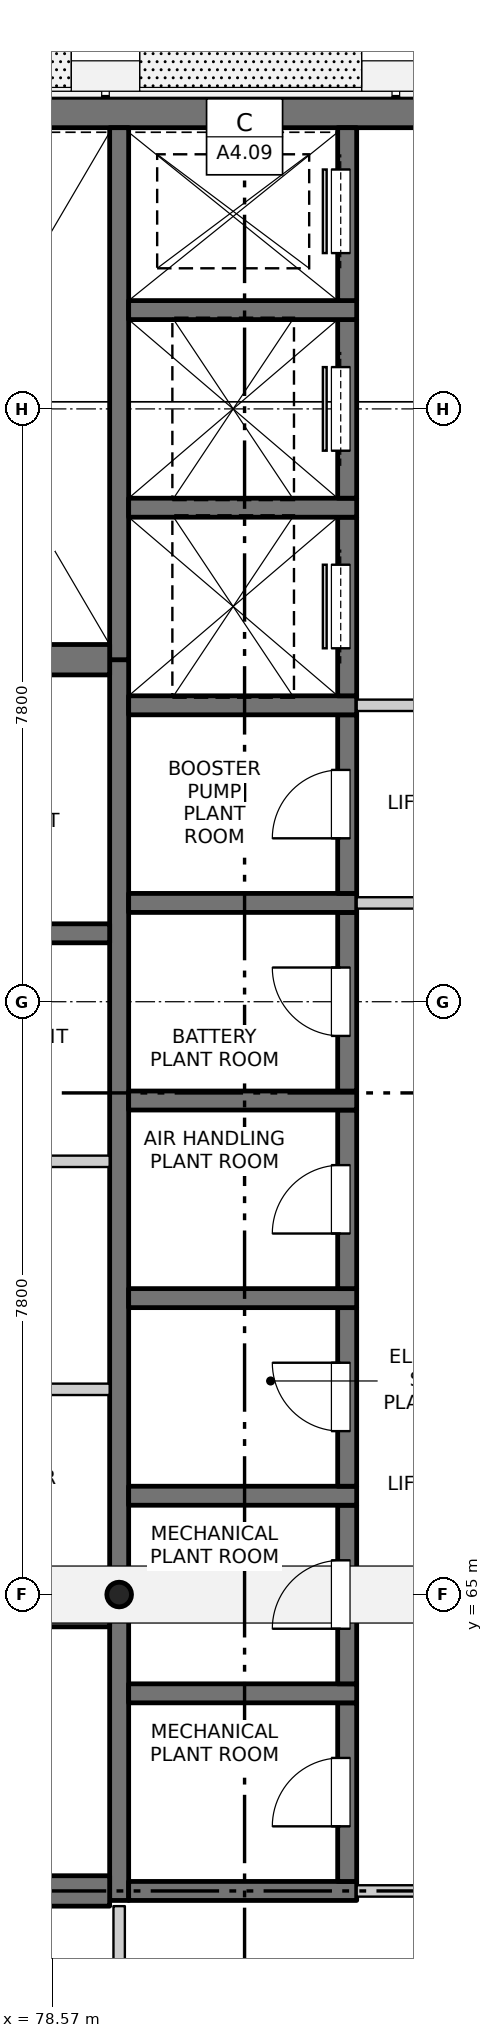
"""IFC4 building model, lengths in metres.
Left out: names, types, materials, properties, quantities, classifications, styles, units other than length and angle.
Written with IfcOpenShell. Run it as: python <this file> out.ifc"""

import sys

from ifc_helpers import new_model, si_unit, direction, frame, frame_2d, origin, origin_2d, place, context, subcontext, project, spatial, rectangle, hollow_circle, extrude, element, fill, save


model = new_model("IFC4")
c1 = context("Model", 3, precision=1e-05, world=origin(), true_north=direction((0.0, 1.0)))
c2 = subcontext(c1, "Body", "Model", "MODEL_VIEW")
j1 = project(units=[si_unit("LENGTHUNIT", "METRE"), si_unit("PLANEANGLEUNIT", "RADIAN")], contexts=[c1])
p1 = place(None, origin())
s1 = spatial("IfcSite", under=j1, at=p1, CompositionType="ELEMENT")
p2 = place(p1, origin())
s2 = spatial("IfcBuilding", under=s1, at=p2, CompositionType="ELEMENT")
p3 = place(p2, frame((0.0, 0.0, 266.4)))
s3 = spatial("IfcBuildingStorey", under=s2, at=p3, CompositionType="ELEMENT", Elevation=266.4)
p4 = place(p3, frame((75.45, 84.5, -0.3), z_axis=(0.0, 0.0, 1.0), x_axis=(1.0, 0.0, 0.0)))
e1 = element("IfcWall", 1, at=p4, inside=s3, PredefinedType="SOLIDWALL", context=c2, shape_type="SweptSolid", body=[
    extrude(rectangle(XDim=19.1, YDim=0.4, at=frame_2d((9.55, 0.0))), origin(), (0.0, 0.0, 1.0), 6.0),
])
p5 = place(p3, frame((79.45, 60.975, -0.3), z_axis=(0.0, 0.0, 1.0), x_axis=(0.0, 1.0, 0.0)))
e2 = element("IfcWall", 2, at=p5, inside=s3, PredefinedType="SOLIDWALL", context=c2, shape_type="SweptSolid", body=[
    extrude(rectangle(XDim=16.325, YDim=0.25, at=frame_2d((8.163, 0.0))), origin(), (0.0, 0.0, 1.0), 6.0),
])
p6 = place(p3, frame((79.45, 77.3, -0.3), z_axis=(0.0, 0.0, 1.0), x_axis=(0.0, 1.0, 0.0)))
e3 = element("IfcWall", 3, at=p6, inside=s3, PredefinedType="SOLIDWALL", context=c2, shape_type="SweptSolid", body=[
    extrude(rectangle(XDim=7.0, YDim=0.25, at=frame_2d((3.5, 0.0))), origin(), (0.0, 0.0, 1.0), 6.0),
])
p7 = place(p3, frame((79.575, 61.1, -0.3), z_axis=(0.0, 0.0, 1.0), x_axis=(1.0, 0.0, 0.0)))
e4 = element("IfcWall", 4, at=p7, inside=s3, PredefinedType="SOLIDWALL", context=c2, shape_type="SweptSolid", body=[
    extrude(rectangle(XDim=3.0, YDim=0.25, at=frame_2d((1.5, 0.0))), origin(), (0.0, 0.0, 1.0), 6.0),
])
p8 = place(p3, frame((82.45, 61.225, -0.3), z_axis=(0.0, 0.0, 1.0), x_axis=(0.0, 1.0, 0.0)))
e5 = element("IfcWall", 5, at=p8, inside=s3, PredefinedType="SOLIDWALL", context=c2, shape_type="SweptSolid", body=[
    extrude(rectangle(XDim=2.35, YDim=0.25, at=frame_2d((1.175, 0.0))), origin(), (0.0, 0.0, 1.0), 6.0),
])
p9 = place(p8, frame((0.725, 0.0, 0.3)))
e6 = element("IfcOpeningElement", 6, at=p9, cuts=e5, PredefinedType="OPENING", context=c2, shape_type="SweptSolid", body=[
    extrude(rectangle(XDim=0.9, YDim=2.1, at=frame_2d((0.45, 1.05))), frame((0.0, 0.135, 0.0), z_axis=(0.0, -1.0, 0.0), x_axis=(1.0, 0.0, 0.0)), (0.0, 0.0, 1.0), 0.27),
])
p10 = place(p3, frame((79.575, 63.7, -0.3), z_axis=(0.0, 0.0, 1.0), x_axis=(1.0, 0.0, 0.0)))
e7 = element("IfcWall", 7, at=p10, inside=s3, PredefinedType="SOLIDWALL", context=c2, shape_type="SweptSolid", body=[
    extrude(rectangle(XDim=3.0, YDim=0.25, at=frame_2d((1.5, 0.0))), origin(), (0.0, 0.0, 1.0), 6.0),
])
p11 = place(p3, frame((82.45, 63.825, -0.3), z_axis=(0.0, 0.0, 1.0), x_axis=(0.0, 1.0, 0.0)))
e8 = element("IfcWall", 8, at=p11, inside=s3, PredefinedType="SOLIDWALL", context=c2, shape_type="SweptSolid", body=[
    extrude(rectangle(XDim=2.35, YDim=0.25, at=frame_2d((1.175, 0.0))), origin(), (0.0, 0.0, 1.0), 6.0),
])
p12 = place(p11, frame((0.725, 0.0, 0.3)))
e9 = element("IfcOpeningElement", 9, at=p12, cuts=e8, PredefinedType="OPENING", context=c2, shape_type="SweptSolid", body=[
    extrude(rectangle(XDim=0.9, YDim=2.1, at=frame_2d((0.45, 1.05))), frame((0.0, 0.135, 0.0), z_axis=(0.0, -1.0, 0.0), x_axis=(1.0, 0.0, 0.0)), (0.0, 0.0, 1.0), 0.27),
])
p13 = place(p3, frame((79.575, 66.3, -0.3), z_axis=(0.0, 0.0, 1.0), x_axis=(1.0, 0.0, 0.0)))
e10 = element("IfcWall", 10, at=p13, inside=s3, PredefinedType="SOLIDWALL", context=c2, shape_type="SweptSolid", body=[
    extrude(rectangle(XDim=3.0, YDim=0.25, at=frame_2d((1.5, 0.0))), origin(), (0.0, 0.0, 1.0), 6.0),
])
p14 = place(p3, frame((82.45, 66.425, -0.3), z_axis=(0.0, 0.0, 1.0), x_axis=(0.0, 1.0, 0.0)))
e11 = element("IfcWall", 11, at=p14, inside=s3, PredefinedType="SOLIDWALL", context=c2, shape_type="SweptSolid", body=[
    extrude(rectangle(XDim=2.35, YDim=0.25, at=frame_2d((1.175, 0.0))), origin(), (0.0, 0.0, 1.0), 6.0),
])
p15 = place(p14, frame((0.725, 0.0, 0.3)))
e12 = element("IfcOpeningElement", 12, at=p15, cuts=e11, PredefinedType="OPENING", context=c2, shape_type="SweptSolid", body=[
    extrude(rectangle(XDim=0.9, YDim=2.1, at=frame_2d((0.45, 1.05))), frame((0.0, 0.135, 0.0), z_axis=(0.0, -1.0, 0.0), x_axis=(1.0, 0.0, 0.0)), (0.0, 0.0, 1.0), 0.27),
])
p16 = place(p3, frame((79.575, 68.9, -0.3), z_axis=(0.0, 0.0, 1.0), x_axis=(1.0, 0.0, 0.0)))
e13 = element("IfcWall", 13, at=p16, inside=s3, PredefinedType="SOLIDWALL", context=c2, shape_type="SweptSolid", body=[
    extrude(rectangle(XDim=3.0, YDim=0.25, at=frame_2d((1.5, 0.0))), origin(), (0.0, 0.0, 1.0), 6.0),
])
p17 = place(p3, frame((82.45, 69.025, -0.3), z_axis=(0.0, 0.0, 1.0), x_axis=(0.0, 1.0, 0.0)))
e14 = element("IfcWall", 14, at=p17, inside=s3, PredefinedType="SOLIDWALL", context=c2, shape_type="SweptSolid", body=[
    extrude(rectangle(XDim=2.35, YDim=0.25, at=frame_2d((1.175, 0.0))), origin(), (0.0, 0.0, 1.0), 6.0),
])
p18 = place(p17, frame((0.725, 0.0, 0.3)))
e15 = element("IfcOpeningElement", 15, at=p18, cuts=e14, PredefinedType="OPENING", context=c2, shape_type="SweptSolid", body=[
    extrude(rectangle(XDim=0.9, YDim=2.1, at=frame_2d((0.45, 1.05))), frame((0.0, 0.135, 0.0), z_axis=(0.0, -1.0, 0.0), x_axis=(1.0, 0.0, 0.0)), (0.0, 0.0, 1.0), 0.27),
])
p19 = place(p3, frame((79.575, 71.5, -0.3), z_axis=(0.0, 0.0, 1.0), x_axis=(1.0, 0.0, 0.0)))
e16 = element("IfcWall", 16, at=p19, inside=s3, PredefinedType="SOLIDWALL", context=c2, shape_type="SweptSolid", body=[
    extrude(rectangle(XDim=3.0, YDim=0.25, at=frame_2d((1.5, 0.0))), origin(), (0.0, 0.0, 1.0), 6.0),
])
p20 = place(p3, frame((82.45, 71.625, -0.3), z_axis=(0.0, 0.0, 1.0), x_axis=(0.0, 1.0, 0.0)))
e17 = element("IfcWall", 17, at=p20, inside=s3, PredefinedType="SOLIDWALL", context=c2, shape_type="SweptSolid", body=[
    extrude(rectangle(XDim=2.35, YDim=0.25, at=frame_2d((1.175, 0.0))), origin(), (0.0, 0.0, 1.0), 6.0),
])
p21 = place(p20, frame((0.725, 0.0, 0.3)))
e18 = element("IfcOpeningElement", 18, at=p21, cuts=e17, PredefinedType="OPENING", context=c2, shape_type="SweptSolid", body=[
    extrude(rectangle(XDim=0.9, YDim=2.1, at=frame_2d((0.45, 1.05))), frame((0.0, 0.135, 0.0), z_axis=(0.0, -1.0, 0.0), x_axis=(1.0, 0.0, 0.0)), (0.0, 0.0, 1.0), 0.27),
])
p22 = place(p3, frame((79.575, 74.1, -0.3), z_axis=(0.0, 0.0, 1.0), x_axis=(1.0, 0.0, 0.0)))
e19 = element("IfcWall", 19, at=p22, inside=s3, PredefinedType="SOLIDWALL", context=c2, shape_type="SweptSolid", body=[
    extrude(rectangle(XDim=3.0, YDim=0.25, at=frame_2d((1.5, 0.0))), origin(), (0.0, 0.0, 1.0), 6.0),
])
p23 = place(p3, frame((82.45, 74.225, -0.3), z_axis=(0.0, 0.0, 1.0), x_axis=(0.0, 1.0, 0.0)))
e20 = element("IfcWall", 20, at=p23, inside=s3, PredefinedType="SOLIDWALL", context=c2, shape_type="SweptSolid", body=[
    extrude(rectangle(XDim=2.35, YDim=0.25, at=frame_2d((1.175, 0.0))), origin(), (0.0, 0.0, 1.0), 6.0),
])
p24 = place(p23, frame((0.725, 0.0, 0.3)))
e21 = element("IfcOpeningElement", 21, at=p24, cuts=e20, PredefinedType="OPENING", context=c2, shape_type="SweptSolid", body=[
    extrude(rectangle(XDim=0.9, YDim=2.1, at=frame_2d((0.45, 1.05))), frame((0.0, 0.135, 0.0), z_axis=(0.0, -1.0, 0.0), x_axis=(1.0, 0.0, 0.0)), (0.0, 0.0, 1.0), 0.27),
])
p25 = place(p3, frame((79.575, 76.7, -0.3), z_axis=(0.0, 0.0, 1.0), x_axis=(1.0, 0.0, 0.0)))
e22 = element("IfcWall", 22, at=p25, inside=s3, PredefinedType="SOLIDWALL", context=c2, shape_type="SweptSolid", body=[
    extrude(rectangle(XDim=3.0, YDim=0.25, at=frame_2d((1.5, 0.0))), origin(), (0.0, 0.0, 1.0), 6.0),
])
p26 = place(p3, frame((82.45, 76.825, -0.3), z_axis=(0.0, 0.0, 1.0), x_axis=(0.0, 1.0, 0.0)))
e23 = element("IfcWall", 23, at=p26, inside=s3, PredefinedType="SOLIDWALL", context=c2, shape_type="SweptSolid", body=[
    extrude(rectangle(XDim=2.35, YDim=0.25, at=frame_2d((1.175, 0.0))), origin(), (0.0, 0.0, 1.0), 6.0),
])
p27 = place(p26, frame((0.625, 0.0, 0.3)))
e24 = element("IfcOpeningElement", 24, at=p27, cuts=e23, PredefinedType="OPENING", context=c2, shape_type="SweptSolid", body=[
    extrude(rectangle(XDim=1.1, YDim=2.1, at=frame_2d((0.55, 1.05))), frame((0.0, 0.135, 0.0), z_axis=(0.0, -1.0, 0.0), x_axis=(1.0, 0.0, 0.0)), (0.0, 0.0, 1.0), 0.27),
])
p28 = place(p3, frame((79.575, 79.3, -0.3), z_axis=(0.0, 0.0, 1.0), x_axis=(1.0, 0.0, 0.0)))
e25 = element("IfcWall", 25, at=p28, inside=s3, PredefinedType="SOLIDWALL", context=c2, shape_type="SweptSolid", body=[
    extrude(rectangle(XDim=3.0, YDim=0.25, at=frame_2d((1.5, 0.0))), origin(), (0.0, 0.0, 1.0), 6.0),
])
p29 = place(p3, frame((82.45, 79.425, -0.3), z_axis=(0.0, 0.0, 1.0), x_axis=(0.0, 1.0, 0.0)))
e26 = element("IfcWall", 26, at=p29, inside=s3, PredefinedType="SOLIDWALL", context=c2, shape_type="SweptSolid", body=[
    extrude(rectangle(XDim=2.35, YDim=0.25, at=frame_2d((1.175, 0.0))), origin(), (0.0, 0.0, 1.0), 6.0),
])
p30 = place(p29, frame((0.625, 0.0, 0.3)))
e27 = element("IfcOpeningElement", 27, at=p30, cuts=e26, PredefinedType="OPENING", context=c2, shape_type="SweptSolid", body=[
    extrude(rectangle(XDim=1.1, YDim=2.1, at=frame_2d((0.55, 1.05))), frame((0.0, 0.135, 0.0), z_axis=(0.0, -1.0, 0.0), x_axis=(1.0, 0.0, 0.0)), (0.0, 0.0, 1.0), 0.27),
])
p31 = place(p3, frame((79.575, 81.9, -0.3), z_axis=(0.0, 0.0, 1.0), x_axis=(1.0, 0.0, 0.0)))
e28 = element("IfcWall", 28, at=p31, inside=s3, PredefinedType="SOLIDWALL", context=c2, shape_type="SweptSolid", body=[
    extrude(rectangle(XDim=3.0, YDim=0.25, at=frame_2d((1.5, 0.0))), origin(), (0.0, 0.0, 1.0), 6.0),
])
p32 = place(p3, frame((82.45, 82.025, -0.3), z_axis=(0.0, 0.0, 1.0), x_axis=(0.0, 1.0, 0.0)))
e29 = element("IfcWall", 29, at=p32, inside=s3, PredefinedType="SOLIDWALL", context=c2, shape_type="SweptSolid", body=[
    extrude(rectangle(XDim=2.275, YDim=0.25, at=frame_2d((1.138, 0.0))), origin(), (0.0, 0.0, 1.0), 6.0),
])
p33 = place(p32, frame((0.625, 0.0, 0.3)))
e30 = element("IfcOpeningElement", 30, at=p33, cuts=e29, PredefinedType="OPENING", context=c2, shape_type="SweptSolid", body=[
    extrude(rectangle(XDim=1.1, YDim=2.1, at=frame_2d((0.55, 1.05))), frame((0.0, 0.135, 0.0), z_axis=(0.0, -1.0, 0.0), x_axis=(1.0, 0.0, 0.0)), (0.0, 0.0, 1.0), 0.27),
])
p34 = place(p3, frame((75.45, 61.1, -0.3), z_axis=(0.0, 0.0, 1.0), x_axis=(1.0, 0.0, 0.0)))
e31 = element("IfcWall", 31, at=p34, inside=s3, PredefinedType="SOLIDWALL", context=c2, shape_type="SweptSolid", body=[
    extrude(rectangle(XDim=3.875, YDim=0.4, at=frame_2d((1.938, 0.0))), origin(), (0.0, 0.0, 1.0), 6.0),
])
for number, where, z_axis, x_axis in (
    (32, (75.45, 64.7, -0.3), (0.0, 0.0, 1.0), (1.0, 0.0, 0.0)),
    (33, (75.45, 73.7, -0.3), (0.0, 0.0, 1.0), (1.0, 0.0, 0.0)),
):
    element("IfcWall", number, at=place(p3, frame(where, z_axis=z_axis, x_axis=x_axis)), inside=s3, PredefinedType="SOLIDWALL", context=c2, shape_type="SweptSolid", body=[
        extrude(rectangle(XDim=3.875, YDim=0.25, at=frame_2d((1.938, 0.0))), origin(), (0.0, 0.0, 1.0), 6.0),
    ])
p35 = place(p3, frame((75.45, 77.3, -0.3), z_axis=(0.0, 0.0, 1.0), x_axis=(1.0, 0.0, 0.0)))
e34 = element("IfcWall", 34, at=p35, inside=s3, PredefinedType="SOLIDWALL", context=c2, shape_type="SweptSolid", body=[
    extrude(rectangle(XDim=3.875, YDim=0.4, at=frame_2d((1.938, 0.0))), origin(), (0.0, 0.0, 1.0), 6.0),
])
p36 = place(p3, frame((79.45, 65.0, 6.996), z_axis=(0.0, 0.0, 1.0), x_axis=(1.0, 0.0, 0.0)))
e35 = element("IfcColumn", 35, at=p36, inside=s3, PredefinedType="COLUMN", context=c2, shape_type="SweptSolid", body=[
    extrude(hollow_circle(Radius=0.163, WallThickness=0.012, at=origin_2d()), origin(), (0.0, 0.0, 1.0), 8.212),
])
p37 = place(p3, frame((82.575, 61.1, 0.0), z_axis=(0.0, 0.0, 1.0), x_axis=(1.0, 0.0, 0.0)))
e36 = element("IfcWall", 36, at=p37, inside=s3, PredefinedType="PARTITIONING", context=c2, shape_type="SweptSolid", body=[
    extrude(rectangle(XDim=4.85, YDim=0.15, at=frame_2d((2.425, 0.0))), origin(), (0.0, 0.0, 1.0), 5.7),
])
p38 = place(p37, frame((1.525, 0.0, 0.0)))
e37 = element("IfcOpeningElement", 37, at=p38, cuts=e36, PredefinedType="OPENING", context=c2, shape_type="SweptSolid", body=[
    extrude(rectangle(XDim=1.8, YDim=2.1, at=frame_2d((0.9, 1.05))), frame((0.0, 0.085, 0.0), z_axis=(0.0, -1.0, 0.0), x_axis=(1.0, 0.0, 0.0)), (0.0, 0.0, 1.0), 0.17),
])
for number, where, z_axis, x_axis in (
    (38, (75.45, 67.7, 0.0), (0.0, 0.0, 1.0), (1.0, 0.0, 0.0)),
    (39, (75.45, 70.7, 0.0), (0.0, 0.0, 1.0), (1.0, 0.0, 0.0)),
):
    element("IfcWall", number, at=place(p3, frame(where, z_axis=z_axis, x_axis=x_axis)), inside=s3, PredefinedType="PARTITIONING", context=c2, shape_type="SweptSolid", body=[
        extrude(rectangle(XDim=3.875, YDim=0.15, at=frame_2d((1.938, 0.0))), origin(), (0.0, 0.0, 1.0), 5.7),
    ])
p39 = place(p3, frame((82.575, 74.1, 0.0), z_axis=(0.0, 0.0, 1.0), x_axis=(1.0, 0.0, 0.0)))
e40 = element("IfcWall", 40, at=p39, inside=s3, PredefinedType="PARTITIONING", context=c2, shape_type="SweptSolid", body=[
    extrude(rectangle(XDim=4.85, YDim=0.15, at=frame_2d((2.425, 0.0))), origin(), (0.0, 0.0, 1.0), 5.7),
])
p40 = place(p39, frame((1.525, 0.0, 0.0)))
e41 = element("IfcOpeningElement", 41, at=p40, cuts=e40, PredefinedType="OPENING", context=c2, shape_type="SweptSolid", body=[
    extrude(rectangle(XDim=1.8, YDim=2.1, at=frame_2d((0.9, 1.05))), frame((0.0, 0.085, 0.0), z_axis=(0.0, -1.0, 0.0), x_axis=(1.0, 0.0, 0.0)), (0.0, 0.0, 1.0), 0.17),
])
p41 = place(p3, frame((82.575, 76.7, 0.0), z_axis=(0.0, 0.0, 1.0), x_axis=(1.0, 0.0, 0.0)))
e42 = element("IfcWall", 42, at=p41, inside=s3, PredefinedType="PARTITIONING", context=c2, shape_type="SweptSolid", body=[
    extrude(rectangle(XDim=4.85, YDim=0.15, at=frame_2d((2.425, 0.0))), origin(), (0.0, 0.0, 1.0), 5.7),
])
p42 = place(p41, frame((1.525, 0.0, 0.0)))
e43 = element("IfcOpeningElement", 43, at=p42, cuts=e42, PredefinedType="OPENING", context=c2, shape_type="SweptSolid", body=[
    extrude(rectangle(XDim=1.8, YDim=2.1, at=frame_2d((0.9, 1.05))), frame((0.0, 0.085, 0.0), z_axis=(0.0, -1.0, 0.0), x_axis=(1.0, 0.0, 0.0)), (0.0, 0.0, 1.0), 0.17),
])
p43 = place(p3, frame((79.45, 55.45, 0.0), z_axis=(0.0, 0.0, 1.0), x_axis=(0.0, 1.0, 0.0)))
e44 = element("IfcWall", 44, at=p43, inside=s3, PredefinedType="PARTITIONING", context=c2, shape_type="SweptSolid", body=[
    extrude(rectangle(XDim=5.45, YDim=0.15, at=frame_2d((2.725, 0.0))), origin(), (0.0, 0.0, 1.0), 5.7),
])
p44 = place(p43, frame((2.25, 0.0, 0.0)))
e45 = element("IfcOpeningElement", 45, at=p44, cuts=e44, PredefinedType="OPENING", context=c2, shape_type="SweptSolid", body=[
    extrude(rectangle(XDim=0.9, YDim=2.1, at=frame_2d((0.45, 1.05))), frame((0.0, 0.085, 0.0), z_axis=(0.0, -1.0, 0.0), x_axis=(1.0, 0.0, 0.0)), (0.0, 0.0, 1.0), 0.17),
])
p45 = place(p9, origin())
e46 = element("IfcDoor", 46, at=p45, inside=s3, OperationType="SINGLE_SWING_LEFT", PredefinedType="DOOR", context=c2, shape_type="SweptSolid", body=[
    extrude(rectangle(XDim=0.9, YDim=2.1, at=frame_2d((0.45, 1.05))), frame((0.0, 0.11, 0.0), z_axis=(0.0, -1.0, 0.0), x_axis=(1.0, 0.0, 0.0)), (0.0, 0.0, 1.0), 0.05),
])
fill(e6, e46)
p46 = place(p12, origin())
e47 = element("IfcDoor", 47, at=p46, inside=s3, OperationType="SINGLE_SWING_LEFT", PredefinedType="DOOR", context=c2, shape_type="SweptSolid", body=[
    extrude(rectangle(XDim=0.9, YDim=2.1, at=frame_2d((0.45, 1.05))), frame((0.0, 0.11, 0.0), z_axis=(0.0, -1.0, 0.0), x_axis=(1.0, 0.0, 0.0)), (0.0, 0.0, 1.0), 0.05),
])
fill(e9, e47)
p47 = place(p15, origin())
e48 = element("IfcDoor", 48, at=p47, inside=s3, OperationType="SINGLE_SWING_RIGHT", PredefinedType="DOOR", context=c2, shape_type="SweptSolid", body=[
    extrude(rectangle(XDim=0.9, YDim=2.1, at=frame_2d((0.45, 1.05))), frame((0.0, 0.11, 0.0), z_axis=(0.0, -1.0, 0.0), x_axis=(1.0, 0.0, 0.0)), (0.0, 0.0, 1.0), 0.05),
])
fill(e12, e48)
p48 = place(p18, origin())
e49 = element("IfcDoor", 49, at=p48, inside=s3, OperationType="SINGLE_SWING_LEFT", PredefinedType="DOOR", context=c2, shape_type="SweptSolid", body=[
    extrude(rectangle(XDim=0.9, YDim=2.1, at=frame_2d((0.45, 1.05))), frame((0.0, 0.11, 0.0), z_axis=(0.0, -1.0, 0.0), x_axis=(1.0, 0.0, 0.0)), (0.0, 0.0, 1.0), 0.05),
])
fill(e15, e49)
p49 = place(p21, origin())
e50 = element("IfcDoor", 50, at=p49, inside=s3, OperationType="SINGLE_SWING_RIGHT", PredefinedType="DOOR", context=c2, shape_type="SweptSolid", body=[
    extrude(rectangle(XDim=0.9, YDim=2.1, at=frame_2d((0.45, 1.05))), frame((0.0, 0.11, 0.0), z_axis=(0.0, -1.0, 0.0), x_axis=(1.0, 0.0, 0.0)), (0.0, 0.0, 1.0), 0.05),
])
fill(e18, e50)
p50 = place(p24, origin())
e51 = element("IfcDoor", 51, at=p50, inside=s3, OperationType="SINGLE_SWING_LEFT", PredefinedType="DOOR", context=c2, shape_type="SweptSolid", body=[
    extrude(rectangle(XDim=0.9, YDim=2.1, at=frame_2d((0.45, 1.05))), frame((0.0, 0.11, 0.0), z_axis=(0.0, -1.0, 0.0), x_axis=(1.0, 0.0, 0.0)), (0.0, 0.0, 1.0), 0.05),
])
fill(e21, e51)
p51 = place(p27, origin())
e52 = element("IfcDoor", 52, at=p51, inside=s3, OperationType="SLIDING_TO_LEFT", PredefinedType="DOOR", context=c2, shape_type="SweptSolid", body=[
    extrude(rectangle(XDim=1.1, YDim=2.1, at=frame_2d((0.55, 1.05))), frame((0.0, 0.11, 0.0), z_axis=(0.0, -1.0, 0.0), x_axis=(1.0, 0.0, 0.0)), (0.0, 0.0, 1.0), 0.05),
])
fill(e24, e52)
p52 = place(p30, origin())
e53 = element("IfcDoor", 53, at=p52, inside=s3, OperationType="SLIDING_TO_LEFT", PredefinedType="DOOR", context=c2, shape_type="SweptSolid", body=[
    extrude(rectangle(XDim=1.1, YDim=2.1, at=frame_2d((0.55, 1.05))), frame((0.0, 0.11, 0.0), z_axis=(0.0, -1.0, 0.0), x_axis=(1.0, 0.0, 0.0)), (0.0, 0.0, 1.0), 0.05),
])
fill(e27, e53)
p53 = place(p33, origin())
e54 = element("IfcDoor", 54, at=p53, inside=s3, OperationType="SLIDING_TO_RIGHT", PredefinedType="DOOR", context=c2, shape_type="SweptSolid", body=[
    extrude(rectangle(XDim=1.1, YDim=2.1, at=frame_2d((0.55, 1.05))), frame((0.0, 0.11, 0.0), z_axis=(0.0, -1.0, 0.0), x_axis=(1.0, 0.0, 0.0)), (0.0, 0.0, 1.0), 0.05),
])
fill(e30, e54)
save(model, sys.argv[1])
